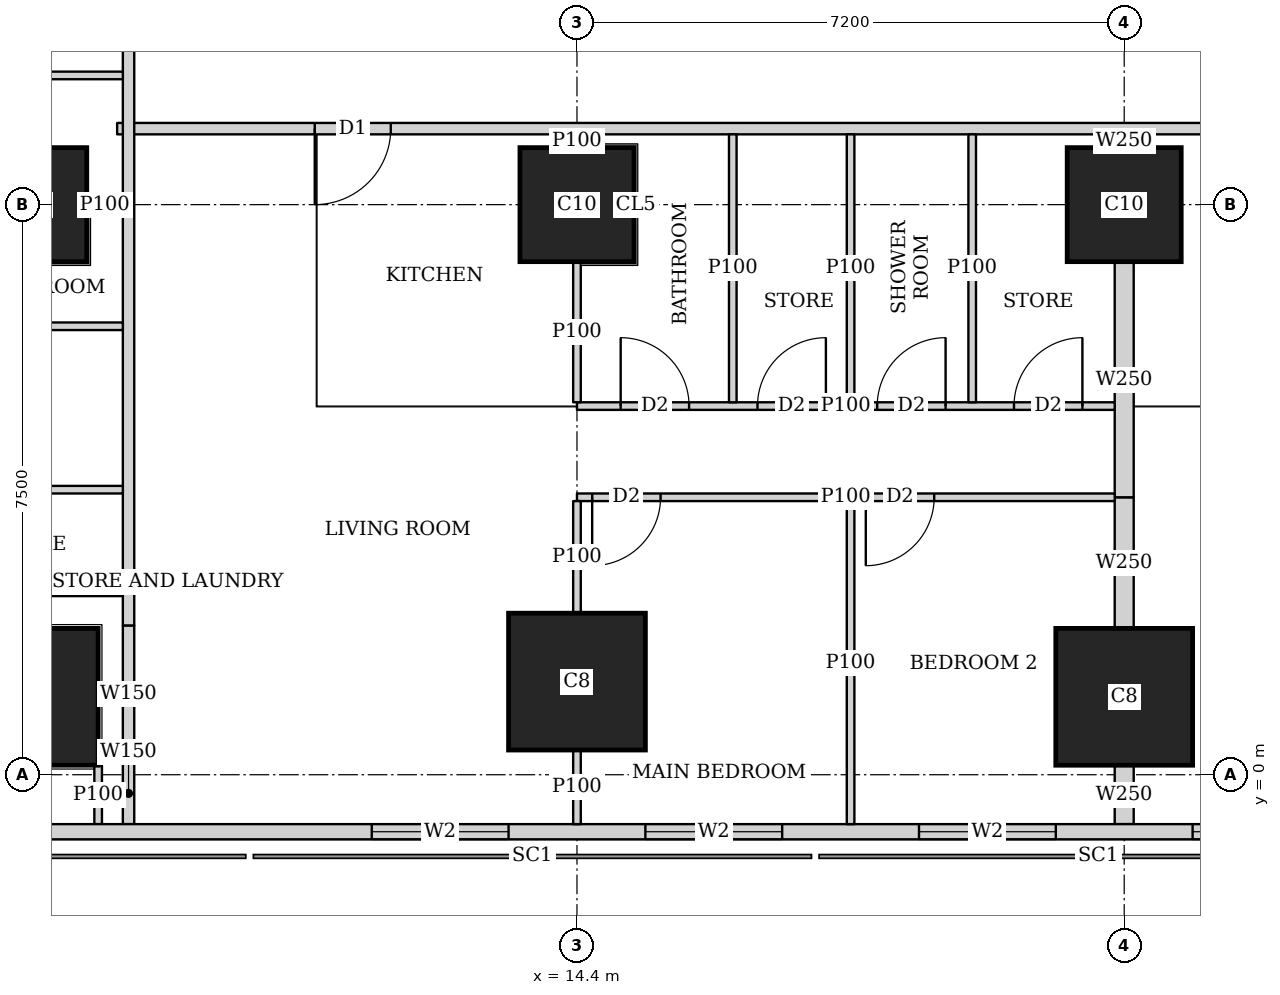
"""IFC4 building model, lengths in metres.
Left out: names, types, materials, properties, quantities, classifications, styles, units other than length and angle.
Written with IfcOpenShell. Run it as: python <this file> out.ifc"""

import sys

from ifc_helpers import new_model, si_unit, direction, frame, frame_2d, origin, origin_2d, place, context, subcontext, project, spatial, rectangle, extrude, element, fill, save


model = new_model("IFC4")
c1 = context("Model", 3, precision=1e-05, world=origin(), true_north=direction((0.0, 1.0)))
c2 = subcontext(c1, "Body", "Model", "MODEL_VIEW")
j1 = project(units=[si_unit("LENGTHUNIT", "METRE"), si_unit("PLANEANGLEUNIT", "RADIAN")], contexts=[c1])
p1 = place(None, origin())
s1 = spatial("IfcSite", under=j1, at=p1, CompositionType="ELEMENT")
p2 = place(p1, origin())
s2 = spatial("IfcBuilding", under=s1, at=p2, CompositionType="ELEMENT")
p3 = place(p2, frame((0.0, 0.0, 184.55)))
s3 = spatial("IfcBuildingStorey", under=s2, at=p3, CompositionType="ELEMENT", Elevation=184.55)
for number, where, z_axis, x_axis in (
    (1, (7.2, 1.025, 0.0), (0.0, 0.0, 1.0), (1.0, 0.0, 0.0)),
    (2, (14.4, 1.225, 0.0), (0.0, 0.0, 1.0), (1.0, 0.0, 0.0)),
    (3, (21.6, 1.025, 0.0), (0.0, 0.0, 1.0), (1.0, 0.0, 0.0)),
):
    element("IfcColumn", number, at=place(p3, frame(where, z_axis=z_axis, x_axis=x_axis)), inside=s3, PredefinedType="COLUMN", context=c2, shape_type="SweptSolid", body=[
        extrude(rectangle(XDim=1.8, YDim=1.8, at=origin_2d()), origin(), (0.0, 0.0, 1.0), 3.75),
    ])
for number, where, z_axis, x_axis in (
    (4, (7.2, 7.5, 0.0), (0.0, 0.0, 1.0), (1.0, 0.0, 0.0)),
    (5, (14.4, 7.5, 0.0), (0.0, 0.0, 1.0), (1.0, 0.0, 0.0)),
    (6, (21.6, 7.5, 0.0), (0.0, 0.0, 1.0), (1.0, 0.0, 0.0)),
):
    element("IfcColumn", number, at=place(p3, frame(where, z_axis=z_axis, x_axis=x_axis)), inside=s3, PredefinedType="COLUMN", context=c2, shape_type="SweptSolid", body=[
        extrude(rectangle(XDim=1.5, YDim=1.5, at=origin_2d()), origin(), (0.0, 0.0, 1.0), 3.75),
    ])
p4 = place(p3, frame((2.163, -0.75, 0.0), z_axis=(0.0, 0.0, 1.0), x_axis=(1.0, 0.0, 0.0)))
e7 = element("IfcWall", 7, at=p4, inside=s3, PredefinedType="SOLIDWALL", context=c2, shape_type="SweptSolid", body=[
    extrude(rectangle(XDim=45.628, YDim=0.2, at=frame_2d((22.814, 0.0))), origin(), (0.0, 0.0, 1.0), 3.45),
])
p5 = place(p4, frame((9.537, 0.0, 0.9)))
e8 = element("IfcOpeningElement", 8, at=p5, cuts=e7, PredefinedType="OPENING", context=c2, shape_type="SweptSolid", body=[
    extrude(rectangle(XDim=1.8, YDim=1.5, at=frame_2d((0.9, 0.75))), frame((0.0, 0.11, 0.0), z_axis=(0.0, -1.0, 0.0), x_axis=(1.0, 0.0, 0.0)), (0.0, 0.0, 1.0), 0.22),
])
p6 = place(p4, frame((13.137, 0.0, 0.9)))
e9 = element("IfcOpeningElement", 9, at=p6, cuts=e7, PredefinedType="OPENING", context=c2, shape_type="SweptSolid", body=[
    extrude(rectangle(XDim=1.8, YDim=1.5, at=frame_2d((0.9, 0.75))), frame((0.0, 0.11, 0.0), z_axis=(0.0, -1.0, 0.0), x_axis=(1.0, 0.0, 0.0)), (0.0, 0.0, 1.0), 0.22),
])
p7 = place(p4, frame((16.737, 0.0, 0.9)))
e10 = element("IfcOpeningElement", 10, at=p7, cuts=e7, PredefinedType="OPENING", context=c2, shape_type="SweptSolid", body=[
    extrude(rectangle(XDim=1.8, YDim=1.5, at=frame_2d((0.9, 0.75))), frame((0.0, 0.11, 0.0), z_axis=(0.0, -1.0, 0.0), x_axis=(1.0, 0.0, 0.0)), (0.0, 0.0, 1.0), 0.22),
])
p8 = place(p4, frame((20.337, 0.0, 0.9)))
e11 = element("IfcOpeningElement", 11, at=p8, cuts=e7, PredefinedType="OPENING", context=c2, shape_type="SweptSolid", body=[
    extrude(rectangle(XDim=1.8, YDim=1.5, at=frame_2d((0.9, 0.75))), frame((0.0, 0.11, 0.0), z_axis=(0.0, -1.0, 0.0), x_axis=(1.0, 0.0, 0.0)), (0.0, 0.0, 1.0), 0.22),
])
p9 = place(p4, frame((23.937, 0.0, 0.9)))
e12 = element("IfcOpeningElement", 12, at=p9, cuts=e7, PredefinedType="OPENING", context=c2, shape_type="SweptSolid", body=[
    extrude(rectangle(XDim=1.8, YDim=1.5, at=frame_2d((0.9, 0.75))), frame((0.0, 0.11, 0.0), z_axis=(0.0, -1.0, 0.0), x_axis=(1.0, 0.0, 0.0)), (0.0, 0.0, 1.0), 0.22),
])
p10 = place(p4, frame((27.537, 0.0, 0.9)))
e13 = element("IfcOpeningElement", 13, at=p10, cuts=e7, PredefinedType="OPENING", context=c2, shape_type="SweptSolid", body=[
    extrude(rectangle(XDim=1.8, YDim=1.5, at=frame_2d((0.9, 0.75))), frame((0.0, 0.11, 0.0), z_axis=(0.0, -1.0, 0.0), x_axis=(1.0, 0.0, 0.0)), (0.0, 0.0, 1.0), 0.22),
])
p11 = place(p4, frame((31.137, 0.0, 0.9)))
e14 = element("IfcOpeningElement", 14, at=p11, cuts=e7, PredefinedType="OPENING", context=c2, shape_type="SweptSolid", body=[
    extrude(rectangle(XDim=1.8, YDim=1.5, at=frame_2d((0.9, 0.75))), frame((0.0, 0.11, 0.0), z_axis=(0.0, -1.0, 0.0), x_axis=(1.0, 0.0, 0.0)), (0.0, 0.0, 1.0), 0.22),
])
p12 = place(p4, frame((34.737, 0.0, 0.9)))
e15 = element("IfcOpeningElement", 15, at=p12, cuts=e7, PredefinedType="OPENING", context=c2, shape_type="SweptSolid", body=[
    extrude(rectangle(XDim=1.8, YDim=1.5, at=frame_2d((0.9, 0.75))), frame((0.0, 0.11, 0.0), z_axis=(0.0, -1.0, 0.0), x_axis=(1.0, 0.0, 0.0)), (0.0, 0.0, 1.0), 0.22),
])
p13 = place(p3, frame((8.5, -0.65, 0.0), z_axis=(0.0, 0.0, 1.0), x_axis=(0.0, 1.0, 0.0)))
e16 = element("IfcWall", 16, at=p13, inside=s3, PredefinedType="SOLIDWALL", context=c2, shape_type="SweptSolid", body=[
    extrude(rectangle(XDim=0.809, YDim=0.15, at=frame_2d((0.404, 0.0))), origin(), (0.0, 0.0, 1.0), 3.45),
])
p14 = place(p3, frame((8.5, 0.159, 0.0), z_axis=(0.0, 0.0, 1.0), x_axis=(0.0, 1.0, 0.0)))
e17 = element("IfcWall", 17, at=p14, inside=s3, PredefinedType="SOLIDWALL", context=c2, shape_type="SweptSolid", body=[
    extrude(rectangle(XDim=1.805, YDim=0.15, at=frame_2d((0.903, 0.0))), origin(), (0.0, 0.0, 1.0), 2.05),
])
p15 = place(p3, frame((8.5, 1.964, 0.0), z_axis=(0.0, 0.0, 1.0), x_axis=(0.0, 1.0, 0.0)))
e18 = element("IfcWall", 18, at=p15, inside=s3, PredefinedType="SOLIDWALL", context=c2, shape_type="SweptSolid", body=[
    extrude(rectangle(XDim=41.097, YDim=0.15, at=frame_2d((20.548, 0.0))), origin(), (0.0, 0.0, 1.0), 3.45),
])
p16 = place(p15, frame((10.661, 0.0, 0.0)))
e19 = element("IfcOpeningElement", 19, at=p16, cuts=e18, PredefinedType="OPENING", context=c2, shape_type="SweptSolid", body=[
    extrude(rectangle(XDim=1.0, YDim=2.1, at=frame_2d((0.5, 1.05))), frame((0.0, 0.085, 0.0), z_axis=(0.0, -1.0, 0.0), x_axis=(1.0, 0.0, 0.0)), (0.0, 0.0, 1.0), 0.17),
])
p17 = place(p15, frame((14.411, 0.0, 0.0)))
e20 = element("IfcOpeningElement", 20, at=p17, cuts=e18, PredefinedType="OPENING", context=c2, shape_type="SweptSolid", body=[
    extrude(rectangle(XDim=1.0, YDim=2.1, at=frame_2d((0.5, 1.05))), frame((0.0, 0.085, 0.0), z_axis=(0.0, -1.0, 0.0), x_axis=(1.0, 0.0, 0.0)), (0.0, 0.0, 1.0), 0.17),
])
p18 = place(p15, frame((21.911, 0.0, 0.0)))
e21 = element("IfcOpeningElement", 21, at=p18, cuts=e18, PredefinedType="OPENING", context=c2, shape_type="SweptSolid", body=[
    extrude(rectangle(XDim=1.0, YDim=2.1, at=frame_2d((0.5, 1.05))), frame((0.0, 0.085, 0.0), z_axis=(0.0, -1.0, 0.0), x_axis=(1.0, 0.0, 0.0)), (0.0, 0.0, 1.0), 0.17),
])
p19 = place(p15, frame((33.161, 0.0, 0.0)))
e22 = element("IfcOpeningElement", 22, at=p19, cuts=e18, PredefinedType="OPENING", context=c2, shape_type="SweptSolid", body=[
    extrude(rectangle(XDim=1.0, YDim=2.1, at=frame_2d((0.5, 1.05))), frame((0.0, 0.085, 0.0), z_axis=(0.0, -1.0, 0.0), x_axis=(1.0, 0.0, 0.0)), (0.0, 0.0, 1.0), 0.17),
])
p20 = place(p3, frame((40.053, 8.5, 0.0), z_axis=(0.0, 0.0, 1.0), x_axis=(-1.0, 0.0, 0.0)))
e23 = element("IfcWall", 23, at=p20, inside=s3, PredefinedType="SOLIDWALL", context=c2, shape_type="SweptSolid", body=[
    extrude(rectangle(XDim=31.703, YDim=0.15, at=frame_2d((15.852, 0.0))), origin(), (0.0, 0.0, 1.0), 3.45),
])
p21 = place(p20, frame((28.103, 0.0, 0.0)))
e24 = element("IfcOpeningElement", 24, at=p21, cuts=e23, PredefinedType="OPENING", context=c2, shape_type="SweptSolid", body=[
    extrude(rectangle(XDim=1.0, YDim=2.1, at=frame_2d((0.5, 1.05))), frame((0.0, 0.085, 0.0), z_axis=(0.0, -1.0, 0.0), x_axis=(1.0, 0.0, 0.0)), (0.0, 0.0, 1.0), 0.17),
])
p22 = place(p20, frame((15.953, 0.0, 0.0)))
e25 = element("IfcOpeningElement", 25, at=p22, cuts=e23, PredefinedType="OPENING", context=c2, shape_type="SweptSolid", body=[
    extrude(rectangle(XDim=1.0, YDim=2.1, at=frame_2d((0.5, 1.05))), frame((0.0, 0.085, 0.0), z_axis=(0.0, -1.0, 0.0), x_axis=(1.0, 0.0, 0.0)), (0.0, 0.0, 1.0), 0.17),
])
p23 = place(p20, frame((8.753, 0.0, 0.0)))
e26 = element("IfcOpeningElement", 26, at=p23, cuts=e23, PredefinedType="OPENING", context=c2, shape_type="SweptSolid", body=[
    extrude(rectangle(XDim=1.0, YDim=2.1, at=frame_2d((0.5, 1.05))), frame((0.0, 0.085, 0.0), z_axis=(0.0, -1.0, 0.0), x_axis=(1.0, 0.0, 0.0)), (0.0, 0.0, 1.0), 0.17),
])
p24 = place(p3, frame((8.1, 0.124, 0.0), z_axis=(0.0, 0.0, 1.0), x_axis=(0.0, -1.0, 0.0)))
e27 = element("IfcWall", 27, at=p24, inside=s3, PredefinedType="PARTITIONING", context=c2, shape_type="SweptSolid", body=[
    extrude(rectangle(XDim=0.774, YDim=0.1, at=frame_2d((0.387, 0.0))), origin(), (0.0, 0.0, 1.0), 3.45),
])
p25 = place(p3, frame((4.9, 3.75, 0.0), z_axis=(0.0, 0.0, 1.0), x_axis=(1.0, 0.0, 0.0)))
e28 = element("IfcWall", 28, at=p25, inside=s3, PredefinedType="PARTITIONING", context=c2, shape_type="SweptSolid", body=[
    extrude(rectangle(XDim=3.525, YDim=0.1, at=frame_2d((1.763, 0.0))), origin(), (0.0, 0.0, 1.0), 3.45),
])
p26 = place(p3, frame((7.951, 7.5, 0.0), z_axis=(0.0, 0.0, 1.0), x_axis=(1.0, 0.0, 0.0)))
e29 = element("IfcWall", 29, at=p26, inside=s3, PredefinedType="PARTITIONING", context=c2, shape_type="SweptSolid", body=[
    extrude(rectangle(XDim=0.474, YDim=0.1, at=frame_2d((0.237, 0.0))), origin(), (0.0, 0.0, 1.0), 3.45),
])
for number, where, z_axis, x_axis in (
    (30, (4.9, 9.2, 0.0), (0.0, 0.0, 1.0), (1.0, 0.0, 0.0)),
    (31, (4.9, 5.9, 0.0), (0.0, 0.0, 1.0), (1.0, 0.0, 0.0)),
):
    element("IfcWall", number, at=place(p3, frame(where, z_axis=z_axis, x_axis=x_axis)), inside=s3, PredefinedType="PARTITIONING", context=c2, shape_type="SweptSolid", body=[
        extrude(rectangle(XDim=3.525, YDim=0.1, at=frame_2d((1.763, 0.0))), origin(), (0.0, 0.0, 1.0), 3.45),
    ])
p27 = place(p3, frame((21.475, 3.65, 0.0), z_axis=(0.0, 0.0, 1.0), x_axis=(-1.0, 0.0, 0.0)))
e32 = element("IfcWall", 32, at=p27, inside=s3, PredefinedType="PARTITIONING", context=c2, shape_type="SweptSolid", body=[
    extrude(rectangle(XDim=7.075, YDim=0.1, at=frame_2d((3.538, 0.0))), origin(), (0.0, 0.0, 1.0), 3.45),
])
p28 = place(p27, frame((5.975, 0.0, 0.0)))
e33 = element("IfcOpeningElement", 33, at=p28, cuts=e32, PredefinedType="OPENING", context=c2, shape_type="SweptSolid", body=[
    extrude(rectangle(XDim=0.9, YDim=2.1, at=frame_2d((0.45, 1.05))), frame((0.0, 0.06, 0.0), z_axis=(0.0, -1.0, 0.0), x_axis=(1.0, 0.0, 0.0)), (0.0, 0.0, 1.0), 0.12),
])
p29 = place(p27, frame((2.375, 0.0, 0.0)))
e34 = element("IfcOpeningElement", 34, at=p29, cuts=e32, PredefinedType="OPENING", context=c2, shape_type="SweptSolid", body=[
    extrude(rectangle(XDim=0.9, YDim=2.1, at=frame_2d((0.45, 1.05))), frame((0.0, 0.06, 0.0), z_axis=(0.0, -1.0, 0.0), x_axis=(1.0, 0.0, 0.0)), (0.0, 0.0, 1.0), 0.12),
])
p30 = place(p3, frame((21.475, 4.85, 0.0), z_axis=(0.0, 0.0, 1.0), x_axis=(-1.0, 0.0, 0.0)))
e35 = element("IfcWall", 35, at=p30, inside=s3, PredefinedType="PARTITIONING", context=c2, shape_type="SweptSolid", body=[
    extrude(rectangle(XDim=7.075, YDim=0.1, at=frame_2d((3.538, 0.0))), origin(), (0.0, 0.0, 1.0), 3.45),
])
p31 = place(p30, frame((5.6, 0.0, 0.0)))
e36 = element("IfcOpeningElement", 36, at=p31, cuts=e35, PredefinedType="OPENING", context=c2, shape_type="SweptSolid", body=[
    extrude(rectangle(XDim=0.9, YDim=2.1, at=frame_2d((0.45, 1.05))), frame((0.0, 0.06, 0.0), z_axis=(0.0, -1.0, 0.0), x_axis=(1.0, 0.0, 0.0)), (0.0, 0.0, 1.0), 0.12),
])
p32 = place(p30, frame((2.225, 0.0, 0.0)))
e37 = element("IfcOpeningElement", 37, at=p32, cuts=e35, PredefinedType="OPENING", context=c2, shape_type="SweptSolid", body=[
    extrude(rectangle(XDim=0.9, YDim=2.1, at=frame_2d((0.45, 1.05))), frame((0.0, 0.06, 0.0), z_axis=(0.0, -1.0, 0.0), x_axis=(1.0, 0.0, 0.0)), (0.0, 0.0, 1.0), 0.12),
])
p33 = place(p30, frame((3.8, 0.0, 0.0)))
e38 = element("IfcOpeningElement", 38, at=p33, cuts=e35, PredefinedType="OPENING", context=c2, shape_type="SweptSolid", body=[
    extrude(rectangle(XDim=0.9, YDim=2.1, at=frame_2d((0.45, 1.05))), frame((0.0, 0.06, 0.0), z_axis=(0.0, -1.0, 0.0), x_axis=(1.0, 0.0, 0.0)), (0.0, 0.0, 1.0), 0.12),
])
p34 = place(p30, frame((0.425, 0.0, 0.0)))
e39 = element("IfcOpeningElement", 39, at=p34, cuts=e35, PredefinedType="OPENING", context=c2, shape_type="SweptSolid", body=[
    extrude(rectangle(XDim=0.9, YDim=2.1, at=frame_2d((0.45, 1.05))), frame((0.0, 0.06, 0.0), z_axis=(0.0, -1.0, 0.0), x_axis=(1.0, 0.0, 0.0)), (0.0, 0.0, 1.0), 0.12),
])
p35 = place(p3, frame((14.4, -0.65, 0.0), z_axis=(0.0, 0.0, 1.0), x_axis=(0.0, 1.0, 0.0)))
e40 = element("IfcWall", 40, at=p35, inside=s3, PredefinedType="PARTITIONING", context=c2, shape_type="SweptSolid", body=[
    extrude(rectangle(XDim=0.974, YDim=0.1, at=frame_2d((0.487, 0.0))), origin(), (0.0, 0.0, 1.0), 3.45),
])
p36 = place(p3, frame((14.4, 2.126, 0.0), z_axis=(0.0, 0.0, 1.0), x_axis=(0.0, 1.0, 0.0)))
e41 = element("IfcWall", 41, at=p36, inside=s3, PredefinedType="PARTITIONING", context=c2, shape_type="SweptSolid", body=[
    extrude(rectangle(XDim=1.474, YDim=0.1, at=frame_2d((0.737, 0.0))), origin(), (0.0, 0.0, 1.0), 3.45),
])
p37 = place(p3, frame((18.0, -0.65, 0.0), z_axis=(0.0, 0.0, 1.0), x_axis=(0.0, 1.0, 0.0)))
e42 = element("IfcWall", 42, at=p37, inside=s3, PredefinedType="PARTITIONING", context=c2, shape_type="SweptSolid", body=[
    extrude(rectangle(XDim=4.25, YDim=0.1, at=frame_2d((2.125, 0.0))), origin(), (0.0, 0.0, 1.0), 2.05),
])
p38 = place(p3, frame((14.4, 4.9, 0.0), z_axis=(0.0, 0.0, 1.0), x_axis=(0.0, 1.0, 0.0)))
e43 = element("IfcWall", 43, at=p38, inside=s3, PredefinedType="PARTITIONING", context=c2, shape_type="SweptSolid", body=[
    extrude(rectangle(XDim=1.849, YDim=0.1, at=frame_2d((0.925, 0.0))), origin(), (0.0, 0.0, 1.0), 3.45),
])
p39 = place(p3, frame((14.4, 8.251, 0.0), z_axis=(0.0, 0.0, 1.0), x_axis=(0.0, 1.0, 0.0)))
e44 = element("IfcWall", 44, at=p39, inside=s3, PredefinedType="PARTITIONING", context=c2, shape_type="SweptSolid", body=[
    extrude(rectangle(XDim=0.174, YDim=0.1, at=frame_2d((0.087, 0.0))), origin(), (0.0, 0.0, 1.0), 3.45),
])
for number, where, z_axis, x_axis in (
    (45, (18.0, 4.9, 0.0), (0.0, 0.0, 1.0), (0.0, 1.0, 0.0)),
    (46, (16.45, 4.9, 0.0), (0.0, 0.0, 1.0), (0.0, 1.0, 0.0)),
    (47, (19.6, 4.9, 0.0), (0.0, 0.0, 1.0), (0.0, 1.0, 0.0)),
):
    element("IfcWall", number, at=place(p3, frame(where, z_axis=z_axis, x_axis=x_axis)), inside=s3, PredefinedType="PARTITIONING", context=c2, shape_type="SweptSolid", body=[
        extrude(rectangle(XDim=3.525, YDim=0.1, at=frame_2d((1.763, 0.0))), origin(), (0.0, 0.0, 1.0), 3.45),
    ])
p40 = place(p3, frame((21.6, -0.65, 0.0), z_axis=(0.0, 0.0, 1.0), x_axis=(0.0, 1.0, 0.0)))
e48 = element("IfcWall", 48, at=p40, inside=s3, PredefinedType="SOLIDWALL", context=c2, shape_type="SweptSolid", body=[
    extrude(rectangle(XDim=0.774, YDim=0.25, at=frame_2d((0.387, 0.0))), origin(), (0.0, 0.0, 1.0), 2.05),
])
p41 = place(p3, frame((21.6, 1.926, 0.0), z_axis=(0.0, 0.0, 1.0), x_axis=(0.0, 1.0, 0.0)))
e49 = element("IfcWall", 49, at=p41, inside=s3, PredefinedType="SOLIDWALL", context=c2, shape_type="SweptSolid", body=[
    extrude(rectangle(XDim=1.724, YDim=0.25, at=frame_2d((0.862, 0.0))), origin(), (0.0, 0.0, 1.0), 2.05),
])
p42 = place(p3, frame((21.6, 3.65, 0.0), z_axis=(0.0, 0.0, 1.0), x_axis=(0.0, 1.0, 0.0)))
e50 = element("IfcWall", 50, at=p42, inside=s3, PredefinedType="SOLIDWALL", context=c2, shape_type="SweptSolid", body=[
    extrude(rectangle(XDim=3.099, YDim=0.25, at=frame_2d((1.55, 0.0))), origin(), (0.0, 0.0, 1.0), 3.45),
])
p43 = place(p3, frame((21.6, 8.251, 0.0), z_axis=(0.0, 0.0, 1.0), x_axis=(0.0, 1.0, 0.0)))
e51 = element("IfcWall", 51, at=p43, inside=s3, PredefinedType="SOLIDWALL", context=c2, shape_type="SweptSolid", body=[
    extrude(rectangle(XDim=0.174, YDim=0.25, at=frame_2d((0.087, 0.0))), origin(), (0.0, 0.0, 1.0), 3.45),
])
p44 = place(p3, frame((5.467, 2.4, 0.0), z_axis=(0.0, 0.0, 1.0), x_axis=(1.0, 0.0, 0.0)))
e52 = element("IfcWall", 52, at=p44, inside=s3, PredefinedType="PARTITIONING", context=c2, shape_type="SweptSolid", body=[
    extrude(rectangle(XDim=2.958, YDim=0.1, at=frame_2d((1.479, 0.0))), origin(), (0.0, 0.0, 1.0), 3.45),
])
p45 = place(p44, frame((0.108, 0.0, 0.0)))
e53 = element("IfcOpeningElement", 53, at=p45, cuts=e52, PredefinedType="OPENING", context=c2, shape_type="SweptSolid", body=[
    extrude(rectangle(XDim=0.9, YDim=2.1, at=frame_2d((0.45, 1.05))), frame((0.0, 0.06, 0.0), z_axis=(0.0, -1.0, 0.0), x_axis=(1.0, 0.0, 0.0)), (0.0, 0.0, 1.0), 0.12),
])
p46 = place(p5, origin())
e54 = element("IfcWindow", 54, at=p46, inside=s3, PartitioningType="SINGLE_PANEL", PredefinedType="WINDOW", context=c2, shape_type="SweptSolid", body=[
    extrude(rectangle(XDim=1.8, YDim=1.5, at=frame_2d((0.9, 0.75))), frame((0.0, 0.03, 0.0), z_axis=(0.0, -1.0, 0.0), x_axis=(1.0, 0.0, 0.0)), (0.0, 0.0, 1.0), 0.06),
])
fill(e8, e54)
p47 = place(p6, origin())
e55 = element("IfcWindow", 55, at=p47, inside=s3, PartitioningType="SINGLE_PANEL", PredefinedType="WINDOW", context=c2, shape_type="SweptSolid", body=[
    extrude(rectangle(XDim=1.8, YDim=1.5, at=frame_2d((0.9, 0.75))), frame((0.0, 0.03, 0.0), z_axis=(0.0, -1.0, 0.0), x_axis=(1.0, 0.0, 0.0)), (0.0, 0.0, 1.0), 0.06),
])
fill(e9, e55)
p48 = place(p7, origin())
e56 = element("IfcWindow", 56, at=p48, inside=s3, PartitioningType="SINGLE_PANEL", PredefinedType="WINDOW", context=c2, shape_type="SweptSolid", body=[
    extrude(rectangle(XDim=1.8, YDim=1.5, at=frame_2d((0.9, 0.75))), frame((0.0, 0.03, 0.0), z_axis=(0.0, -1.0, 0.0), x_axis=(1.0, 0.0, 0.0)), (0.0, 0.0, 1.0), 0.06),
])
fill(e10, e56)
p49 = place(p8, origin())
e57 = element("IfcWindow", 57, at=p49, inside=s3, PartitioningType="SINGLE_PANEL", PredefinedType="WINDOW", context=c2, shape_type="SweptSolid", body=[
    extrude(rectangle(XDim=1.8, YDim=1.5, at=frame_2d((0.9, 0.75))), frame((0.0, 0.03, 0.0), z_axis=(0.0, -1.0, 0.0), x_axis=(1.0, 0.0, 0.0)), (0.0, 0.0, 1.0), 0.06),
])
fill(e11, e57)
p50 = place(p28, origin())
e58 = element("IfcDoor", 58, at=p50, inside=s3, OperationType="SINGLE_SWING_RIGHT", PredefinedType="DOOR", context=c2, shape_type="SweptSolid", body=[
    extrude(rectangle(XDim=0.9, YDim=2.1, at=frame_2d((0.45, 1.05))), frame((0.0, 0.025, 0.0), z_axis=(0.0, -1.0, 0.0), x_axis=(1.0, 0.0, 0.0)), (0.0, 0.0, 1.0), 0.05),
])
fill(e33, e58)
p51 = place(p29, origin())
e59 = element("IfcDoor", 59, at=p51, inside=s3, OperationType="SINGLE_SWING_RIGHT", PredefinedType="DOOR", context=c2, shape_type="SweptSolid", body=[
    extrude(rectangle(XDim=0.9, YDim=2.1, at=frame_2d((0.45, 1.05))), frame((0.0, 0.025, 0.0), z_axis=(0.0, -1.0, 0.0), x_axis=(1.0, 0.0, 0.0)), (0.0, 0.0, 1.0), 0.05),
])
fill(e34, e59)
p52 = place(p31, origin())
e60 = element("IfcDoor", 60, at=p52, inside=s3, OperationType="SINGLE_SWING_LEFT", PredefinedType="DOOR", context=c2, shape_type="SweptSolid", body=[
    extrude(rectangle(XDim=0.9, YDim=2.1, at=frame_2d((0.45, 1.05))), frame((0.0, 0.025, 0.0), z_axis=(0.0, -1.0, 0.0), x_axis=(1.0, 0.0, 0.0)), (0.0, 0.0, 1.0), 0.05),
])
fill(e36, e60)
p53 = place(p32, origin())
e61 = element("IfcDoor", 61, at=p53, inside=s3, OperationType="SINGLE_SWING_RIGHT", PredefinedType="DOOR", context=c2, shape_type="SweptSolid", body=[
    extrude(rectangle(XDim=0.9, YDim=2.1, at=frame_2d((0.45, 1.05))), frame((0.0, 0.025, 0.0), z_axis=(0.0, -1.0, 0.0), x_axis=(1.0, 0.0, 0.0)), (0.0, 0.0, 1.0), 0.05),
])
fill(e37, e61)
p54 = place(p33, origin())
e62 = element("IfcDoor", 62, at=p54, inside=s3, OperationType="SINGLE_SWING_RIGHT", PredefinedType="DOOR", context=c2, shape_type="SweptSolid", body=[
    extrude(rectangle(XDim=0.9, YDim=2.1, at=frame_2d((0.45, 1.05))), frame((0.0, 0.025, 0.0), z_axis=(0.0, -1.0, 0.0), x_axis=(1.0, 0.0, 0.0)), (0.0, 0.0, 1.0), 0.05),
])
fill(e38, e62)
p55 = place(p34, origin())
e63 = element("IfcDoor", 63, at=p55, inside=s3, OperationType="SINGLE_SWING_RIGHT", PredefinedType="DOOR", context=c2, shape_type="SweptSolid", body=[
    extrude(rectangle(XDim=0.9, YDim=2.1, at=frame_2d((0.45, 1.05))), frame((0.0, 0.025, 0.0), z_axis=(0.0, -1.0, 0.0), x_axis=(1.0, 0.0, 0.0)), (0.0, 0.0, 1.0), 0.05),
])
fill(e39, e63)
p56 = place(p21, origin())
e64 = element("IfcDoor", 64, at=p56, inside=s3, OperationType="SINGLE_SWING_RIGHT", PredefinedType="DOOR", context=c2, shape_type="SweptSolid", body=[
    extrude(rectangle(XDim=1.0, YDim=2.1, at=frame_2d((0.5, 1.05))), frame((0.0, 0.025, 0.0), z_axis=(0.0, -1.0, 0.0), x_axis=(1.0, 0.0, 0.0)), (0.0, 0.0, 1.0), 0.05),
])
fill(e24, e64)
save(model, sys.argv[1])
